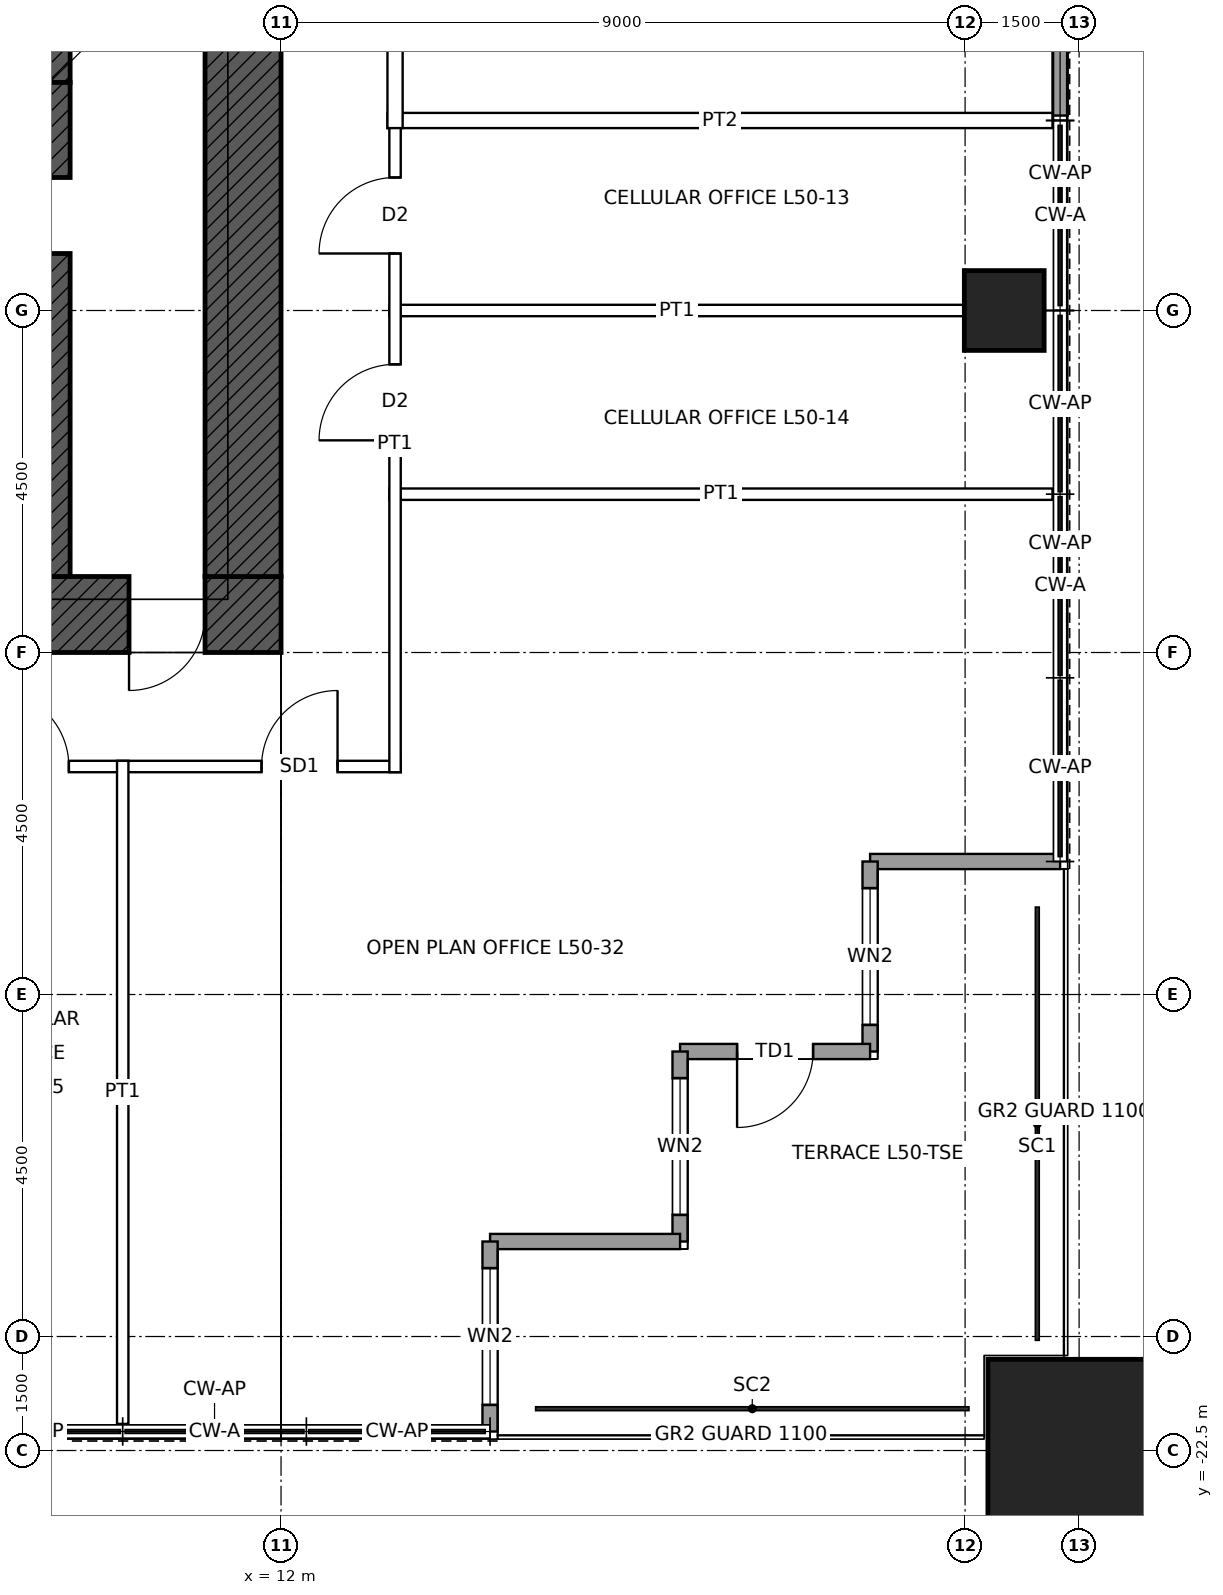
"""IFC4 building model, lengths in metres.
Left out: names, types, materials, properties, quantities, classifications, styles, units other than length and angle.
Written with IfcOpenShell. Run it as: python <this file> out.ifc"""

import sys

from ifc_helpers import new_model, si_unit, direction, frame, frame_2d, origin, origin_2d, place, context, subcontext, project, spatial, rectangle, hollow_rectangle, extrude, element, fill, save


model = new_model("IFC4")
c1 = context("Model", 3, precision=1e-05, world=origin(), true_north=direction((0.0, 1.0)))
c2 = subcontext(c1, "Body", "Model", "MODEL_VIEW")
j1 = project(units=[si_unit("LENGTHUNIT", "METRE"), si_unit("PLANEANGLEUNIT", "RADIAN")], contexts=[c1])
p1 = place(None, origin())
s1 = spatial("IfcSite", under=j1, at=p1, CompositionType="ELEMENT")
p2 = place(p1, origin())
s2 = spatial("IfcBuilding", under=s1, at=p2, CompositionType="ELEMENT")
p3 = place(p2, frame((0.0, 0.0, 233.9)))
s3 = spatial("IfcBuildingStorey", under=s2, at=p3, CompositionType="ELEMENT", Elevation=233.9)
p4 = place(p3, frame((22.5, -22.5, 0.0), z_axis=(0.0, 0.0, 1.0), x_axis=(1.0, 0.0, 0.0)))
e1 = element("IfcColumn", 1, at=p4, inside=s3, PredefinedType="COLUMN", context=c2, shape_type="SweptSolid", body=[
    extrude(hollow_rectangle(XDim=2.4, YDim=2.4, WallThickness=0.12, at=origin_2d()), origin(), (0.0, 0.0, 1.0), 4.0),
])
p5 = place(p3, frame((21.515, -7.5, 0.0), z_axis=(0.0, 0.0, 1.0), x_axis=(1.0, 0.0, 0.0)))
e2 = element("IfcColumn", 2, at=p5, inside=s3, PredefinedType="COLUMN", context=c2, shape_type="SweptSolid", body=[
    extrude(hollow_rectangle(XDim=1.05, YDim=1.05, WallThickness=0.07, at=origin_2d()), origin(), (0.0, 0.0, 1.0), 4.0),
])
p6 = place(p3, frame((12.0, -11.5, 0.0), z_axis=(0.0, 0.0, 1.0), x_axis=(-1.0, 0.0, 0.0)))
e3 = element("IfcWall", 3, at=p6, inside=s3, PredefinedType="SHEAR", context=c2, shape_type="SweptSolid", body=[
    extrude(rectangle(XDim=24.0, YDim=1.0, at=frame_2d((12.0, 0.0))), origin(), (0.0, 0.0, 1.0), 4.0),
])
p7 = place(p6, frame((11.5, 0.0, 0.0)))
e4 = element("IfcOpeningElement", 4, at=p7, cuts=e3, PredefinedType="OPENING", context=c2, shape_type="SweptSolid", body=[
    extrude(rectangle(XDim=1.0, YDim=2.1, at=frame_2d((0.5, 1.05))), frame((0.0, 0.51, 0.0), z_axis=(0.0, -1.0, 0.0), x_axis=(1.0, 0.0, 0.0)), (0.0, 0.0, 1.0), 1.02),
])
p8 = place(p6, frame((1.0, 0.0, 0.0)))
e5 = element("IfcOpeningElement", 5, at=p8, cuts=e3, PredefinedType="OPENING", context=c2, shape_type="SweptSolid", body=[
    extrude(rectangle(XDim=1.0, YDim=2.4, at=frame_2d((0.5, 1.2))), frame((0.0, 0.51, 0.0), z_axis=(0.0, -1.0, 0.0), x_axis=(1.0, 0.0, 0.0)), (0.0, 0.0, 1.0), 1.02),
])
p9 = place(p3, frame((11.5, 11.0, 0.0), z_axis=(0.0, 0.0, 1.0), x_axis=(0.0, -1.0, 0.0)))
e6 = element("IfcWall", 6, at=p9, inside=s3, PredefinedType="SHEAR", context=c2, shape_type="SweptSolid", body=[
    extrude(rectangle(XDim=22.0, YDim=1.0, at=frame_2d((11.0, 0.0))), origin(), (0.0, 0.0, 1.0), 4.0),
])
p10 = place(p9, frame((10.5, 0.0, 0.0)))
e7 = element("IfcOpeningElement", 7, at=p10, cuts=e6, PredefinedType="OPENING", context=c2, shape_type="SweptSolid", body=[
    extrude(rectangle(XDim=1.0, YDim=2.4, at=frame_2d((0.5, 1.2))), frame((0.0, 0.51, 0.0), z_axis=(0.0, -1.0, 0.0), x_axis=(1.0, 0.0, 0.0)), (0.0, 0.0, 1.0), 1.02),
])
p11 = place(p3, frame((-9.0, -4.5, 0.0), z_axis=(0.0, 0.0, 1.0), x_axis=(1.0, 0.0, 0.0)))
e8 = element("IfcWall", 8, at=p11, inside=s3, PredefinedType="SHEAR", context=c2, shape_type="SweptSolid", body=[
    extrude(rectangle(XDim=18.0, YDim=0.45, at=frame_2d((9.0, 0.0))), origin(), (0.0, 0.0, 1.0), 4.0),
])
p12 = place(p3, frame((9.0, -4.5, 0.0), z_axis=(0.0, 0.0, 1.0), x_axis=(0.0, 1.0, 0.0)))
e9 = element("IfcWall", 9, at=p12, inside=s3, PredefinedType="SHEAR", context=c2, shape_type="SweptSolid", body=[
    extrude(rectangle(XDim=3.0, YDim=0.45, at=frame_2d((1.5, 0.0))), origin(), (0.0, 0.0, 1.0), 4.0),
])
p13 = place(p3, frame((9.0, -11.0, 0.0), z_axis=(0.0, 0.0, 1.0), x_axis=(0.0, 1.0, 0.0)))
e10 = element("IfcWall", 10, at=p13, inside=s3, PredefinedType="SHEAR", context=c2, shape_type="SweptSolid", body=[
    extrude(rectangle(XDim=6.5, YDim=0.45, at=frame_2d((3.25, 0.0))), origin(), (0.0, 0.0, 1.0), 4.0),
])
p14 = place(p13, frame((4.25, 0.0, 0.0)))
e11 = element("IfcOpeningElement", 11, at=p14, cuts=e10, PredefinedType="OPENING", context=c2, shape_type="SweptSolid", body=[
    extrude(rectangle(XDim=1.0, YDim=2.1, at=frame_2d((0.5, 1.05))), frame((0.0, 0.235, 0.0), z_axis=(0.0, -1.0, 0.0), x_axis=(1.0, 0.0, 0.0)), (0.0, 0.0, 1.0), 0.47),
])
p15 = place(p3, frame((22.25, -14.75, 0.0), z_axis=(0.0, 0.0, 1.0), x_axis=(-1.0, 0.0, 0.0)))
e12 = element("IfcWall", 12, at=p15, inside=s3, PredefinedType="SOLIDWALL", context=c2, shape_type="SweptSolid", body=[
    extrude(rectangle(XDim=2.5, YDim=0.2, at=frame_2d((1.25, 0.0))), origin(), (0.0, 0.0, 1.0), 3.85),
])
p16 = place(p3, frame((19.75, -14.75, 0.0), z_axis=(0.0, 0.0, 1.0), x_axis=(0.0, -1.0, 0.0)))
e13 = element("IfcWall", 13, at=p16, inside=s3, PredefinedType="SOLIDWALL", context=c2, shape_type="SweptSolid", body=[
    extrude(rectangle(XDim=2.5, YDim=0.2, at=frame_2d((1.25, 0.0))), origin(), (0.0, 0.0, 1.0), 3.85),
])
p17 = place(p16, frame((0.35, 0.0, 0.3)))
e14 = element("IfcOpeningElement", 14, at=p17, cuts=e13, PredefinedType="OPENING", context=c2, shape_type="SweptSolid", body=[
    extrude(rectangle(XDim=1.8, YDim=2.4, at=frame_2d((0.9, 1.2))), frame((0.0, 0.11, 0.0), z_axis=(0.0, -1.0, 0.0), x_axis=(1.0, 0.0, 0.0)), (0.0, 0.0, 1.0), 0.22),
])
p18 = place(p3, frame((19.75, -17.25, 0.0), z_axis=(0.0, 0.0, 1.0), x_axis=(-1.0, 0.0, 0.0)))
e15 = element("IfcWall", 15, at=p18, inside=s3, PredefinedType="SOLIDWALL", context=c2, shape_type="SweptSolid", body=[
    extrude(rectangle(XDim=2.5, YDim=0.2, at=frame_2d((1.25, 0.0))), origin(), (0.0, 0.0, 1.0), 3.85),
])
p19 = place(p18, frame((0.75, 0.0, 0.0)))
e16 = element("IfcOpeningElement", 16, at=p19, cuts=e15, PredefinedType="OPENING", context=c2, shape_type="SweptSolid", body=[
    extrude(rectangle(XDim=1.0, YDim=2.4, at=frame_2d((0.5, 1.2))), frame((0.0, 0.11, 0.0), z_axis=(0.0, -1.0, 0.0), x_axis=(1.0, 0.0, 0.0)), (0.0, 0.0, 1.0), 0.22),
])
p20 = place(p3, frame((17.25, -17.25, 0.0), z_axis=(0.0, 0.0, 1.0), x_axis=(0.0, -1.0, 0.0)))
e17 = element("IfcWall", 17, at=p20, inside=s3, PredefinedType="SOLIDWALL", context=c2, shape_type="SweptSolid", body=[
    extrude(rectangle(XDim=2.5, YDim=0.2, at=frame_2d((1.25, 0.0))), origin(), (0.0, 0.0, 1.0), 3.85),
])
p21 = place(p20, frame((0.35, 0.0, 0.3)))
e18 = element("IfcOpeningElement", 18, at=p21, cuts=e17, PredefinedType="OPENING", context=c2, shape_type="SweptSolid", body=[
    extrude(rectangle(XDim=1.8, YDim=2.4, at=frame_2d((0.9, 1.2))), frame((0.0, 0.11, 0.0), z_axis=(0.0, -1.0, 0.0), x_axis=(1.0, 0.0, 0.0)), (0.0, 0.0, 1.0), 0.22),
])
p22 = place(p3, frame((17.25, -19.75, 0.0), z_axis=(0.0, 0.0, 1.0), x_axis=(-1.0, 0.0, 0.0)))
e19 = element("IfcWall", 19, at=p22, inside=s3, PredefinedType="SOLIDWALL", context=c2, shape_type="SweptSolid", body=[
    extrude(rectangle(XDim=2.5, YDim=0.2, at=frame_2d((1.25, 0.0))), origin(), (0.0, 0.0, 1.0), 3.85),
])
p23 = place(p3, frame((14.75, -19.75, 0.0), z_axis=(0.0, 0.0, 1.0), x_axis=(0.0, -1.0, 0.0)))
e20 = element("IfcWall", 20, at=p23, inside=s3, PredefinedType="SOLIDWALL", context=c2, shape_type="SweptSolid", body=[
    extrude(rectangle(XDim=2.5, YDim=0.2, at=frame_2d((1.25, 0.0))), origin(), (0.0, 0.0, 1.0), 3.85),
])
p24 = place(p23, frame((0.35, 0.0, 0.3)))
e21 = element("IfcOpeningElement", 21, at=p24, cuts=e20, PredefinedType="OPENING", context=c2, shape_type="SweptSolid", body=[
    extrude(rectangle(XDim=1.8, YDim=2.4, at=frame_2d((0.9, 1.2))), frame((0.0, 0.11, 0.0), z_axis=(0.0, -1.0, 0.0), x_axis=(1.0, 0.0, 0.0)), (0.0, 0.0, 1.0), 0.22),
])
p25 = place(p3, frame((22.25, -2.532, 0.0), z_axis=(0.0, 0.0, 1.0), x_axis=(0.0, -1.0, 0.0)))
e22 = element("IfcWall", 22, at=p25, inside=s3, PredefinedType="SOLIDWALL", context=c2, shape_type="SweptSolid", body=[
    extrude(rectangle(XDim=2.403, YDim=0.2, at=frame_2d((1.201, 0.0))), origin(), (0.0, 0.0, 1.0), 3.85),
])
p26 = place(p3, frame((-13.575, -13.5, 0.0), z_axis=(0.0, 0.0, 1.0), x_axis=(1.0, 0.0, 0.0)))
e23 = element("IfcWall", 23, at=p26, inside=s3, PredefinedType="PARTITIONING", context=c2, shape_type="SweptSolid", body=[
    extrude(rectangle(XDim=27.15, YDim=0.15, at=frame_2d((13.575, 0.0))), origin(), (0.0, 0.0, 1.0), 3.85),
])
p27 = place(p26, frame((21.783, 0.0, 0.0)))
e24 = element("IfcOpeningElement", 24, at=p27, cuts=e23, PredefinedType="OPENING", context=c2, shape_type="SweptSolid", body=[
    extrude(rectangle(XDim=1.0, YDim=2.1, at=frame_2d((0.5, 1.05))), frame((0.0, 0.085, 0.0), z_axis=(0.0, -1.0, 0.0), x_axis=(1.0, 0.0, 0.0)), (0.0, 0.0, 1.0), 0.17),
])
p28 = place(p26, frame((19.325, 0.0, 0.0)))
e25 = element("IfcOpeningElement", 25, at=p28, cuts=e23, PredefinedType="OPENING", context=c2, shape_type="SweptSolid", body=[
    extrude(rectangle(XDim=1.0, YDim=2.1, at=frame_2d((0.5, 1.05))), frame((0.0, 0.085, 0.0), z_axis=(0.0, -1.0, 0.0), x_axis=(1.0, 0.0, 0.0)), (0.0, 0.0, 1.0), 0.17),
])
p29 = place(p26, frame((16.825, 0.0, 0.0)))
e26 = element("IfcOpeningElement", 26, at=p29, cuts=e23, PredefinedType="OPENING", context=c2, shape_type="SweptSolid", body=[
    extrude(rectangle(XDim=1.0, YDim=2.1, at=frame_2d((0.5, 1.05))), frame((0.0, 0.085, 0.0), z_axis=(0.0, -1.0, 0.0), x_axis=(1.0, 0.0, 0.0)), (0.0, 0.0, 1.0), 0.17),
])
p30 = place(p26, frame((14.675, 0.0, 0.0)))
e27 = element("IfcOpeningElement", 27, at=p30, cuts=e23, PredefinedType="OPENING", context=c2, shape_type="SweptSolid", body=[
    extrude(rectangle(XDim=1.0, YDim=2.1, at=frame_2d((0.5, 1.05))), frame((0.0, 0.085, 0.0), z_axis=(0.0, -1.0, 0.0), x_axis=(1.0, 0.0, 0.0)), (0.0, 0.0, 1.0), 0.17),
])
p31 = place(p26, frame((11.475, 0.0, 0.0)))
e28 = element("IfcOpeningElement", 28, at=p31, cuts=e23, PredefinedType="OPENING", context=c2, shape_type="SweptSolid", body=[
    extrude(rectangle(XDim=1.0, YDim=2.1, at=frame_2d((0.5, 1.05))), frame((0.0, 0.085, 0.0), z_axis=(0.0, -1.0, 0.0), x_axis=(1.0, 0.0, 0.0)), (0.0, 0.0, 1.0), 0.17),
])
p32 = place(p26, frame((9.325, 0.0, 0.0)))
e29 = element("IfcOpeningElement", 29, at=p32, cuts=e23, PredefinedType="OPENING", context=c2, shape_type="SweptSolid", body=[
    extrude(rectangle(XDim=1.0, YDim=2.1, at=frame_2d((0.5, 1.05))), frame((0.0, 0.085, 0.0), z_axis=(0.0, -1.0, 0.0), x_axis=(1.0, 0.0, 0.0)), (0.0, 0.0, 1.0), 0.17),
])
p33 = place(p26, frame((6.825, 0.0, 0.0)))
e30 = element("IfcOpeningElement", 30, at=p33, cuts=e23, PredefinedType="OPENING", context=c2, shape_type="SweptSolid", body=[
    extrude(rectangle(XDim=1.0, YDim=2.1, at=frame_2d((0.5, 1.05))), frame((0.0, 0.085, 0.0), z_axis=(0.0, -1.0, 0.0), x_axis=(1.0, 0.0, 0.0)), (0.0, 0.0, 1.0), 0.17),
])
p34 = place(p26, frame((4.366, 0.0, 0.0)))
e31 = element("IfcOpeningElement", 31, at=p34, cuts=e23, PredefinedType="OPENING", context=c2, shape_type="SweptSolid", body=[
    extrude(rectangle(XDim=1.0, YDim=2.1, at=frame_2d((0.5, 1.05))), frame((0.0, 0.085, 0.0), z_axis=(0.0, -1.0, 0.0), x_axis=(1.0, 0.0, 0.0)), (0.0, 0.0, 1.0), 0.17),
])
p35 = place(p26, frame((25.318, 0.0, 0.0)))
e32 = element("IfcOpeningElement", 32, at=p35, cuts=e23, PredefinedType="OPENING", context=c2, shape_type="SweptSolid", body=[
    extrude(rectangle(XDim=1.0, YDim=2.4, at=frame_2d((0.5, 1.2))), frame((0.0, 0.085, 0.0), z_axis=(0.0, -1.0, 0.0), x_axis=(1.0, 0.0, 0.0)), (0.0, 0.0, 1.0), 0.17),
])
p36 = place(p26, frame((1.366, 0.0, 0.0)))
e33 = element("IfcOpeningElement", 33, at=p36, cuts=e23, PredefinedType="OPENING", context=c2, shape_type="SweptSolid", body=[
    extrude(rectangle(XDim=1.0, YDim=2.4, at=frame_2d((0.5, 1.2))), frame((0.0, 0.085, 0.0), z_axis=(0.0, -1.0, 0.0), x_axis=(1.0, 0.0, 0.0)), (0.0, 0.0, 1.0), 0.17),
])
p37 = place(p3, frame((13.425, -9.917, 0.0), z_axis=(0.0, 0.0, 1.0), x_axis=(1.0, 0.0, 0.0)))
e34 = element("IfcWall", 34, at=p37, inside=s3, PredefinedType="PARTITIONING", context=c2, shape_type="SweptSolid", body=[
    extrude(rectangle(XDim=8.725, YDim=0.15, at=frame_2d((4.362, 0.0))), origin(), (0.0, 0.0, 1.0), 3.85),
])
p38 = place(p3, frame((13.425, -7.5, 0.0), z_axis=(0.0, 0.0, 1.0), x_axis=(1.0, 0.0, 0.0)))
e35 = element("IfcWall", 35, at=p38, inside=s3, PredefinedType="PARTITIONING", context=c2, shape_type="SweptSolid", body=[
    extrude(rectangle(XDim=7.565, YDim=0.15, at=frame_2d((3.782, 0.0))), origin(), (0.0, 0.0, 1.0), 3.238),
])
p39 = place(p3, frame((13.4, -5.0, 0.0), z_axis=(0.0, 0.0, 1.0), x_axis=(1.0, 0.0, 0.0)))
e36 = element("IfcWall", 36, at=p39, inside=s3, PredefinedType="PARTITIONING", context=c2, shape_type="SweptSolid", body=[
    extrude(rectangle(XDim=8.75, YDim=0.2, at=frame_2d((4.375, 0.0))), origin(), (0.0, 0.0, 1.0), 3.85),
])
p40 = place(p3, frame((9.917, -22.15, 0.0), z_axis=(0.0, 0.0, 1.0), x_axis=(0.0, 1.0, 0.0)))
e37 = element("IfcWall", 37, at=p40, inside=s3, PredefinedType="PARTITIONING", context=c2, shape_type="SweptSolid", body=[
    extrude(rectangle(XDim=8.725, YDim=0.15, at=frame_2d((4.362, 0.0))), origin(), (0.0, 0.0, 1.0), 3.85),
])
p41 = place(p3, frame((13.5, -13.575, 0.0), z_axis=(0.0, 0.0, 1.0), x_axis=(0.0, 1.0, 0.0)))
e38 = element("IfcWall", 38, at=p41, inside=s3, PredefinedType="PARTITIONING", context=c2, shape_type="SweptSolid", body=[
    extrude(rectangle(XDim=8.65, YDim=0.15, at=frame_2d((4.325, 0.0))), origin(), (0.0, 0.0, 1.0), 3.85),
])
p42 = place(p41, frame((6.825, 0.0, 0.0)))
e39 = element("IfcOpeningElement", 39, at=p42, cuts=e38, PredefinedType="OPENING", context=c2, shape_type="SweptSolid", body=[
    extrude(rectangle(XDim=1.0, YDim=2.1, at=frame_2d((0.5, 1.05))), frame((0.0, 0.085, 0.0), z_axis=(0.0, -1.0, 0.0), x_axis=(1.0, 0.0, 0.0)), (0.0, 0.0, 1.0), 0.17),
])
p43 = place(p41, frame((4.366, 0.0, 0.0)))
e40 = element("IfcOpeningElement", 40, at=p43, cuts=e38, PredefinedType="OPENING", context=c2, shape_type="SweptSolid", body=[
    extrude(rectangle(XDim=1.0, YDim=2.1, at=frame_2d((0.5, 1.05))), frame((0.0, 0.085, 0.0), z_axis=(0.0, -1.0, 0.0), x_axis=(1.0, 0.0, 0.0)), (0.0, 0.0, 1.0), 0.17),
])
p44 = place(p3, frame((13.5, -5.1, 0.0), z_axis=(0.0, 0.0, 1.0), x_axis=(0.0, 1.0, 0.0)))
e41 = element("IfcWall", 41, at=p44, inside=s3, PredefinedType="PARTITIONING", context=c2, shape_type="SweptSolid", body=[
    extrude(rectangle(XDim=15.117, YDim=0.2, at=frame_2d((7.559, 0.0))), origin(), (0.0, 0.0, 1.0), 3.85),
])
p45 = place(p44, frame((12.059, 0.0, 0.0)))
e42 = element("IfcOpeningElement", 42, at=p45, cuts=e41, PredefinedType="OPENING", context=c2, shape_type="SweptSolid", body=[
    extrude(rectangle(XDim=1.0, YDim=2.1, at=frame_2d((0.5, 1.05))), frame((0.0, 0.11, 0.0), z_axis=(0.0, -1.0, 0.0), x_axis=(1.0, 0.0, 0.0)), (0.0, 0.0, 1.0), 0.22),
])
p46 = place(p44, frame((7.1, 0.0, 0.0)))
e43 = element("IfcOpeningElement", 43, at=p46, cuts=e41, PredefinedType="OPENING", context=c2, shape_type="SweptSolid", body=[
    extrude(rectangle(XDim=1.0, YDim=2.1, at=frame_2d((0.5, 1.05))), frame((0.0, 0.11, 0.0), z_axis=(0.0, -1.0, 0.0), x_axis=(1.0, 0.0, 0.0)), (0.0, 0.0, 1.0), 0.22),
])
p47 = place(p44, frame((2.1, 0.0, 0.0)))
e44 = element("IfcOpeningElement", 44, at=p47, cuts=e41, PredefinedType="OPENING", context=c2, shape_type="SweptSolid", body=[
    extrude(rectangle(XDim=1.0, YDim=2.1, at=frame_2d((0.5, 1.05))), frame((0.0, 0.11, 0.0), z_axis=(0.0, -1.0, 0.0), x_axis=(1.0, 0.0, 0.0)), (0.0, 0.0, 1.0), 0.22),
])
p48 = place(p17, origin())
e45 = element("IfcWindow", 45, at=p48, inside=s3, PartitioningType="SINGLE_PANEL", PredefinedType="WINDOW", context=c2, shape_type="SweptSolid", body=[
    extrude(rectangle(XDim=1.8, YDim=2.4, at=frame_2d((0.9, 1.2))), frame((0.0, 0.03, 0.0), z_axis=(0.0, -1.0, 0.0), x_axis=(1.0, 0.0, 0.0)), (0.0, 0.0, 1.0), 0.06),
])
fill(e14, e45)
p49 = place(p19, origin())
e46 = element("IfcDoor", 46, at=p49, inside=s3, OperationType="SINGLE_SWING_RIGHT", PredefinedType="DOOR", context=c2, shape_type="SweptSolid", body=[
    extrude(rectangle(XDim=1.0, YDim=2.4, at=frame_2d((0.5, 1.2))), frame((0.0, 0.025, 0.0), z_axis=(0.0, -1.0, 0.0), x_axis=(1.0, 0.0, 0.0)), (0.0, 0.0, 1.0), 0.05),
])
fill(e16, e46)
p50 = place(p21, origin())
e47 = element("IfcWindow", 47, at=p50, inside=s3, PartitioningType="SINGLE_PANEL", PredefinedType="WINDOW", context=c2, shape_type="SweptSolid", body=[
    extrude(rectangle(XDim=1.8, YDim=2.4, at=frame_2d((0.9, 1.2))), frame((0.0, 0.03, 0.0), z_axis=(0.0, -1.0, 0.0), x_axis=(1.0, 0.0, 0.0)), (0.0, 0.0, 1.0), 0.06),
])
fill(e18, e47)
p51 = place(p24, origin())
e48 = element("IfcWindow", 48, at=p51, inside=s3, PartitioningType="SINGLE_PANEL", PredefinedType="WINDOW", context=c2, shape_type="SweptSolid", body=[
    extrude(rectangle(XDim=1.8, YDim=2.4, at=frame_2d((0.9, 1.2))), frame((0.0, 0.03, 0.0), z_axis=(0.0, -1.0, 0.0), x_axis=(1.0, 0.0, 0.0)), (0.0, 0.0, 1.0), 0.06),
])
fill(e21, e48)
p52 = place(p8, origin())
e49 = element("IfcDoor", 49, at=p52, inside=s3, OperationType="SINGLE_SWING_RIGHT", PredefinedType="DOOR", context=c2, shape_type="SweptSolid", body=[
    extrude(rectangle(XDim=1.0, YDim=2.4, at=frame_2d((0.5, 1.2))), frame((0.0, 0.485, 0.0), z_axis=(0.0, -1.0, 0.0), x_axis=(1.0, 0.0, 0.0)), (0.0, 0.0, 1.0), 0.05),
])
fill(e5, e49)
p53 = place(p14, origin())
e50 = element("IfcDoor", 50, at=p53, inside=s3, OperationType="SINGLE_SWING_LEFT", PredefinedType="DOOR", context=c2, shape_type="SweptSolid", body=[
    extrude(rectangle(XDim=1.0, YDim=2.1, at=frame_2d((0.5, 1.05))), frame((0.0, 0.025, 0.0), z_axis=(0.0, -1.0, 0.0), x_axis=(1.0, 0.0, 0.0)), (0.0, 0.0, 1.0), 0.05),
])
fill(e11, e50)
p54 = place(p42, origin())
e51 = element("IfcDoor", 51, at=p54, inside=s3, OperationType="SINGLE_SWING_LEFT", PredefinedType="DOOR", context=c2, shape_type="SweptSolid", body=[
    extrude(rectangle(XDim=1.0, YDim=2.1, at=frame_2d((0.5, 1.05))), frame((0.0, 0.025, 0.0), z_axis=(0.0, -1.0, 0.0), x_axis=(1.0, 0.0, 0.0)), (0.0, 0.0, 1.0), 0.05),
])
fill(e39, e51)
p55 = place(p43, origin())
e52 = element("IfcDoor", 52, at=p55, inside=s3, OperationType="SINGLE_SWING_LEFT", PredefinedType="DOOR", context=c2, shape_type="SweptSolid", body=[
    extrude(rectangle(XDim=1.0, YDim=2.1, at=frame_2d((0.5, 1.05))), frame((0.0, 0.025, 0.0), z_axis=(0.0, -1.0, 0.0), x_axis=(1.0, 0.0, 0.0)), (0.0, 0.0, 1.0), 0.05),
])
fill(e40, e52)
p56 = place(p27, origin())
e53 = element("IfcDoor", 53, at=p56, inside=s3, OperationType="SINGLE_SWING_LEFT", PredefinedType="DOOR", context=c2, shape_type="SweptSolid", body=[
    extrude(rectangle(XDim=1.0, YDim=2.1, at=frame_2d((0.5, 1.05))), frame((0.0, 0.025, 0.0), z_axis=(0.0, -1.0, 0.0), x_axis=(1.0, 0.0, 0.0)), (0.0, 0.0, 1.0), 0.05),
])
fill(e24, e53)
p57 = place(p35, origin())
e54 = element("IfcDoor", 54, at=p57, inside=s3, OperationType="SINGLE_SWING_RIGHT", PredefinedType="DOOR", context=c2, shape_type="SweptSolid", body=[
    extrude(rectangle(XDim=1.0, YDim=2.4, at=frame_2d((0.5, 1.2))), frame((0.0, 0.025, 0.0), z_axis=(0.0, -1.0, 0.0), x_axis=(1.0, 0.0, 0.0)), (0.0, 0.0, 1.0), 0.05),
])
fill(e32, e54)
save(model, sys.argv[1])
